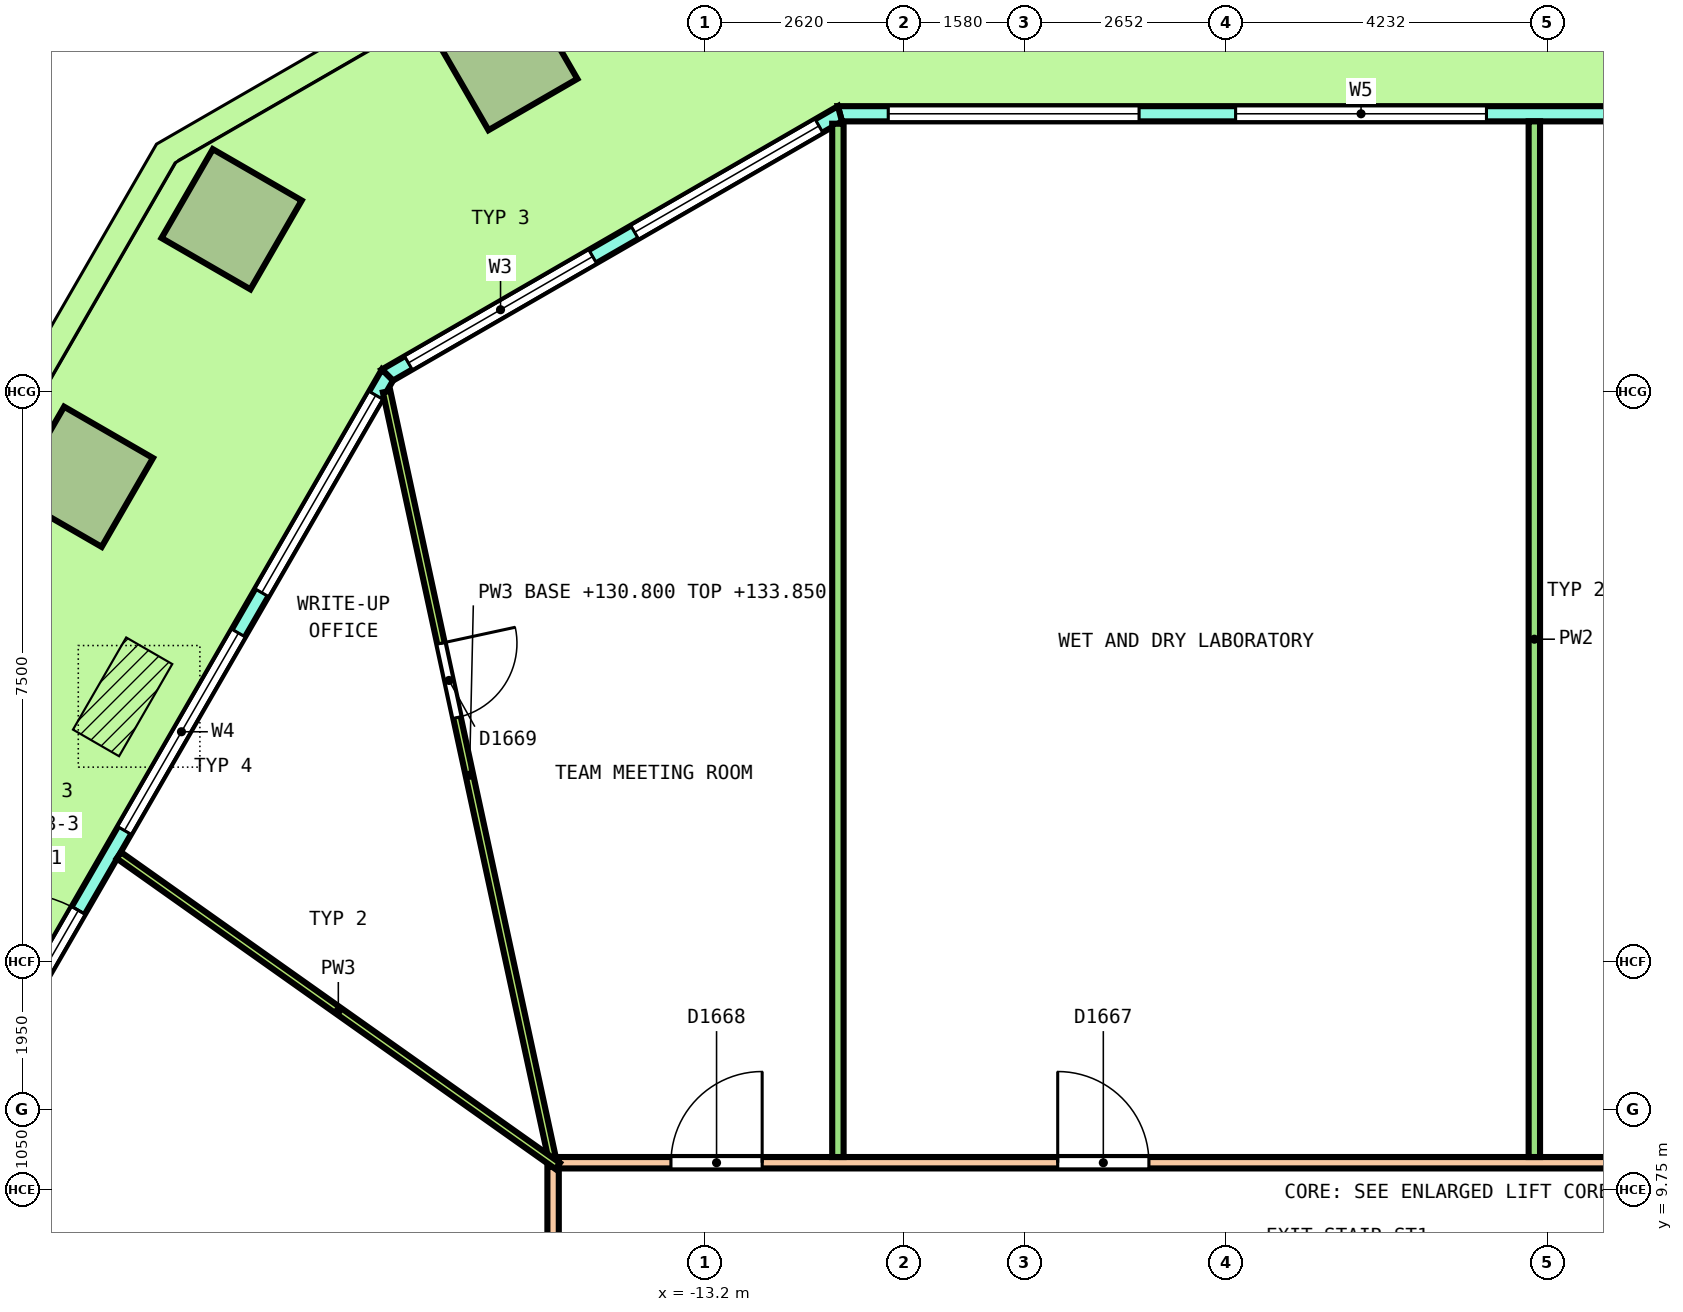
"""IFC4 building model, lengths in metres.
Left out: names, types, materials, properties, quantities, classifications, styles, units other than length and angle.
Written with IfcOpenShell. Run it as: python <this file> out.ifc"""

import sys

from ifc_helpers import new_model, si_unit, direction, frame, frame_2d, origin, origin_2d, place, context, subcontext, project, spatial, polyline, rectangle, outline, extrude, element, fill, save


model = new_model("IFC4")
c1 = context("Model", 3, precision=1e-05, world=origin(), true_north=direction((0.0, 1.0)))
c2 = subcontext(c1, "Body", "Model", "MODEL_VIEW")
j1 = project(units=[si_unit("LENGTHUNIT", "METRE"), si_unit("PLANEANGLEUNIT", "RADIAN")], contexts=[c1])
p1 = place(None, origin())
s1 = spatial("IfcSite", under=j1, at=p1, CompositionType="ELEMENT")
p2 = place(p1, origin())
s2 = spatial("IfcBuilding", under=s1, at=p2, CompositionType="ELEMENT")
p3 = place(p2, frame((0.0, 0.0, 130.8)))
s3 = spatial("IfcBuildingStorey", under=s2, at=p3, CompositionType="ELEMENT", Elevation=130.8)
for number, where, z_axis, x_axis in (
    (1, (-15.803, 24.606, 0.0), (0.0, 0.0, 1.0), (-0.866, -0.5, 0.0)),
    (2, (-19.43, 22.512, 0.0), (0.0, 0.0, 1.0), (-0.5, -0.866, 0.0)),
    (3, (-21.386, 19.124, 0.0), (0.0, 0.0, 1.0), (-0.5, -0.866, 0.0)),
):
    element("IfcColumn", number, at=place(p3, frame(where, z_axis=z_axis, x_axis=x_axis)), inside=s3, PredefinedType="COLUMN", context=c2, shape_type="SweptSolid", body=[
        extrude(rectangle(XDim=1.35, YDim=1.35, at=origin_2d()), origin(), (0.0, 0.0, 1.0), 4.04),
    ])
p4 = place(p3, frame((11.426, 23.9, 0.0), z_axis=(0.0, 0.0, 1.0), x_axis=(-1.0, 0.0, 0.0)))
e4 = element("IfcWall", 4, at=p4, inside=s3, PredefinedType="SOLIDWALL", context=c2, shape_type="SweptSolid", body=[
    extrude(outline(polyline([(-0.027, -0.1), (1.014, -0.1), (2.055, -0.1), (3.097, -0.1), (4.138, -0.1), (5.179, -0.1), (6.22, -0.1), (7.261, -0.1), (8.303, -0.1), (9.344, -0.1), (10.385, -0.1), (11.426, -0.1), (12.468, -0.1), (13.509, -0.1), (14.55, -0.1), (15.591, -0.1), (16.632, -0.1), (17.673, -0.1), (18.715, -0.1), (19.756, -0.1), (20.797, -0.1), (21.838, -0.1), (22.879, -0.1), (22.826, 0.1), (21.789, 0.1), (20.753, 0.1), (19.717, 0.1), (18.68, 0.1), (17.644, 0.1), (16.608, 0.1), (15.572, 0.1), (14.535, 0.1), (13.499, 0.1), (12.463, 0.1), (11.426, 0.1), (10.39, 0.1), (9.354, 0.1), (8.317, 0.1), (7.281, 0.1), (6.245, 0.1), (5.208, 0.1), (4.172, 0.1), (3.136, 0.1), (2.099, 0.1), (1.063, 0.1), (0.027, 0.1), (-0.027, -0.1)])), origin(), (0.0, 0.0, 1.0), 4.1),
])
p5 = place(p4, frame((0.635, 0.0, 0.1)))
e5 = element("IfcOpeningElement", 5, at=p5, cuts=e4, PredefinedType="OPENING", context=c2, shape_type="SweptSolid", body=[
    extrude(rectangle(XDim=3.3, YDim=2.9, at=frame_2d((1.65, 1.45))), frame((0.0, 0.11, 0.0), z_axis=(0.0, -1.0, 0.0), x_axis=(1.0, 0.0, 0.0)), (0.0, 0.0, 1.0), 0.22),
])
p6 = place(p4, frame((5.206, 0.0, 0.1)))
e6 = element("IfcOpeningElement", 6, at=p6, cuts=e4, PredefinedType="OPENING", context=c2, shape_type="SweptSolid", body=[
    extrude(rectangle(XDim=3.3, YDim=2.9, at=frame_2d((1.65, 1.45))), frame((0.0, 0.11, 0.0), z_axis=(0.0, -1.0, 0.0), x_axis=(1.0, 0.0, 0.0)), (0.0, 0.0, 1.0), 0.22),
])
p7 = place(p4, frame((10.526, 0.0, 0.0)))
e7 = element("IfcOpeningElement", 7, at=p7, cuts=e4, PredefinedType="OPENING", context=c2, shape_type="SweptSolid", body=[
    extrude(rectangle(XDim=1.8, YDim=2.4, at=frame_2d((0.9, 1.2))), frame((0.0, 0.11, 0.0), z_axis=(0.0, -1.0, 0.0), x_axis=(1.0, 0.0, 0.0)), (0.0, 0.0, 1.0), 0.22),
])
p8 = place(p4, frame((10.526, 0.0, 2.55)))
e8 = element("IfcOpeningElement", 8, at=p8, cuts=e4, PredefinedType="OPENING", context=c2, shape_type="SweptSolid", body=[
    extrude(rectangle(XDim=1.8, YDim=0.45, at=frame_2d((0.9, 0.225))), frame((0.0, 0.11, 0.0), z_axis=(0.0, -1.0, 0.0), x_axis=(1.0, 0.0, 0.0)), (0.0, 0.0, 1.0), 0.22),
])
p9 = place(p4, frame((14.347, 0.0, 0.1)))
e9 = element("IfcOpeningElement", 9, at=p9, cuts=e4, PredefinedType="OPENING", context=c2, shape_type="SweptSolid", body=[
    extrude(rectangle(XDim=3.3, YDim=2.9, at=frame_2d((1.65, 1.45))), frame((0.0, 0.11, 0.0), z_axis=(0.0, -1.0, 0.0), x_axis=(1.0, 0.0, 0.0)), (0.0, 0.0, 1.0), 0.22),
])
p10 = place(p4, frame((18.917, 0.0, 0.1)))
e10 = element("IfcOpeningElement", 10, at=p10, cuts=e4, PredefinedType="OPENING", context=c2, shape_type="SweptSolid", body=[
    extrude(rectangle(XDim=3.3, YDim=2.9, at=frame_2d((1.65, 1.45))), frame((0.0, 0.11, 0.0), z_axis=(0.0, -1.0, 0.0), x_axis=(1.0, 0.0, 0.0)), (0.0, 0.0, 1.0), 0.22),
])
p11 = place(p3, frame((-11.426, 23.9, 0.0), z_axis=(0.0, 0.0, 1.0), x_axis=(-0.866029458321, -0.49999297727, 0.0)))
e11 = element("IfcWall", 11, at=p11, inside=s3, PredefinedType="SOLIDWALL", context=c2, shape_type="SweptSolid", body=[
    extrude(outline(polyline([(-0.027, -0.1), (1.128, -0.1), (2.282, -0.1), (3.437, -0.1), (4.592, -0.1), (5.747, -0.1), (6.901, -0.1), (6.848, 0.1), (5.711, 0.1), (4.574, 0.1), (3.437, 0.1), (2.301, 0.1), (1.164, 0.1), (0.027, 0.1), (-0.027, -0.1)])), origin(), (0.0, 0.0, 1.0), 4.1),
])
p12 = place(p11, frame((0.319, 0.0, 0.1)))
e12 = element("IfcOpeningElement", 12, at=p12, cuts=e11, PredefinedType="OPENING", context=c2, shape_type="SweptSolid", body=[
    extrude(rectangle(XDim=2.8, YDim=2.9, at=frame_2d((1.4, 1.45))), frame((0.0, 0.11, 0.0), z_axis=(0.0, -1.0, 0.0), x_axis=(1.0, 0.0, 0.0)), (0.0, 0.0, 1.0), 0.22),
])
p13 = place(p11, frame((3.756, 0.0, 0.1)))
e13 = element("IfcOpeningElement", 13, at=p13, cuts=e11, PredefinedType="OPENING", context=c2, shape_type="SweptSolid", body=[
    extrude(rectangle(XDim=2.8, YDim=2.9, at=frame_2d((1.4, 1.45))), frame((0.0, 0.11, 0.0), z_axis=(0.0, -1.0, 0.0), x_axis=(1.0, 0.0, 0.0)), (0.0, 0.0, 1.0), 0.22),
])
p14 = place(p3, frame((-17.38, 20.463, 0.0), z_axis=(0.0, 0.0, 1.0), x_axis=(-0.500000137386, -0.866025324465, 0.0)))
e14 = element("IfcWall", 14, at=p14, inside=s3, PredefinedType="SOLIDWALL", context=c2, shape_type="SweptSolid", body=[
    extrude(outline(polyline([(-0.027, -0.1), (0.979, -0.1), (1.986, -0.1), (2.992, -0.1), (3.999, -0.1), (5.005, -0.1), (6.012, -0.1), (7.018, -0.1), (8.025, -0.1), (9.031, -0.1), (10.038, -0.1), (11.044, -0.1), (12.051, -0.1), (13.057, -0.1), (14.063, -0.1), (15.07, -0.1), (16.076, -0.1), (17.083, -0.1), (18.089, -0.1), (18.036, 0.1), (17.035, 0.1), (16.035, 0.1), (15.034, 0.1), (14.034, 0.1), (13.033, 0.1), (12.033, 0.1), (11.032, 0.1), (10.032, 0.1), (9.031, 0.1), (8.031, 0.1), (7.03, 0.1), (6.03, 0.1), (5.029, 0.1), (4.029, 0.1), (3.028, 0.1), (2.028, 0.1), (1.027, 0.1), (0.027, 0.1), (-0.027, -0.1)])), origin(), (0.0, 0.0, 1.0), 4.1),
])
p15 = place(p14, frame((0.306, 0.0, 0.1)))
e15 = element("IfcOpeningElement", 15, at=p15, cuts=e14, PredefinedType="OPENING", context=c2, shape_type="SweptSolid", body=[
    extrude(rectangle(XDim=3.0, YDim=2.9, at=frame_2d((1.5, 1.45))), frame((0.0, 0.11, 0.0), z_axis=(0.0, -1.0, 0.0), x_axis=(1.0, 0.0, 0.0)), (0.0, 0.0, 1.0), 0.22),
])
p16 = place(p14, frame((3.919, 0.0, 0.1)))
e16 = element("IfcOpeningElement", 16, at=p16, cuts=e14, PredefinedType="OPENING", context=c2, shape_type="SweptSolid", body=[
    extrude(rectangle(XDim=3.0, YDim=2.9, at=frame_2d((1.5, 1.45))), frame((0.0, 0.11, 0.0), z_axis=(0.0, -1.0, 0.0), x_axis=(1.0, 0.0, 0.0)), (0.0, 0.0, 1.0), 0.22),
])
p17 = place(p14, frame((8.131, 0.0, 0.0)))
e17 = element("IfcOpeningElement", 17, at=p17, cuts=e14, PredefinedType="OPENING", context=c2, shape_type="SweptSolid", body=[
    extrude(rectangle(XDim=1.8, YDim=2.4, at=frame_2d((0.9, 1.2))), frame((0.0, 0.11, 0.0), z_axis=(0.0, -1.0, 0.0), x_axis=(1.0, 0.0, 0.0)), (0.0, 0.0, 1.0), 0.22),
])
p18 = place(p14, frame((8.131, 0.0, 2.55)))
e18 = element("IfcOpeningElement", 18, at=p18, cuts=e14, PredefinedType="OPENING", context=c2, shape_type="SweptSolid", body=[
    extrude(rectangle(XDim=1.8, YDim=0.45, at=frame_2d((0.9, 0.225))), frame((0.0, 0.11, 0.0), z_axis=(0.0, -1.0, 0.0), x_axis=(1.0, 0.0, 0.0)), (0.0, 0.0, 1.0), 0.22),
])
p19 = place(p14, frame((11.144, 0.0, 0.1)))
e19 = element("IfcOpeningElement", 19, at=p19, cuts=e14, PredefinedType="OPENING", context=c2, shape_type="SweptSolid", body=[
    extrude(rectangle(XDim=3.0, YDim=2.9, at=frame_2d((1.5, 1.45))), frame((0.0, 0.11, 0.0), z_axis=(0.0, -1.0, 0.0), x_axis=(1.0, 0.0, 0.0)), (0.0, 0.0, 1.0), 0.22),
])
p20 = place(p14, frame((14.756, 0.0, 0.1)))
e20 = element("IfcOpeningElement", 20, at=p20, cuts=e14, PredefinedType="OPENING", context=c2, shape_type="SweptSolid", body=[
    extrude(rectangle(XDim=3.0, YDim=2.9, at=frame_2d((1.5, 1.45))), frame((0.0, 0.11, 0.0), z_axis=(0.0, -1.0, 0.0), x_axis=(1.0, 0.0, 0.0)), (0.0, 0.0, 1.0), 0.22),
])
p21 = place(p3, frame((-15.125, 10.1, 0.0), z_axis=(0.0, 0.0, 1.0), x_axis=(1.0, 0.0, 0.0)))
e21 = element("IfcWall", 21, at=p21, inside=s3, PredefinedType="PARTITIONING", context=c2, shape_type="SweptSolid", body=[
    extrude(rectangle(XDim=30.25, YDim=0.15, at=frame_2d((15.125, 0.0))), origin(), (0.0, 0.0, 1.0), 3.05),
])
p22 = place(p21, frame((16.895, 0.0, 0.0)))
e22 = element("IfcOpeningElement", 22, at=p22, cuts=e21, PredefinedType="OPENING", context=c2, shape_type="SweptSolid", body=[
    extrude(rectangle(XDim=1.2, YDim=2.1, at=frame_2d((0.6, 1.05))), frame((0.0, 0.085, 0.0), z_axis=(0.0, -1.0, 0.0), x_axis=(1.0, 0.0, 0.0)), (0.0, 0.0, 1.0), 0.17),
])
p23 = place(p21, frame((6.564, 0.0, 0.0)))
e23 = element("IfcOpeningElement", 23, at=p23, cuts=e21, PredefinedType="OPENING", context=c2, shape_type="SweptSolid", body=[
    extrude(rectangle(XDim=1.2, YDim=2.1, at=frame_2d((0.6, 1.05))), frame((0.0, 0.085, 0.0), z_axis=(0.0, -1.0, 0.0), x_axis=(1.0, 0.0, 0.0)), (0.0, 0.0, 1.0), 0.17),
])
p24 = place(p21, frame((1.476, 0.0, 0.0)))
e24 = element("IfcOpeningElement", 24, at=p24, cuts=e21, PredefinedType="OPENING", context=c2, shape_type="SweptSolid", body=[
    extrude(rectangle(XDim=1.2, YDim=2.1, at=frame_2d((0.6, 1.05))), frame((0.0, 0.085, 0.0), z_axis=(0.0, -1.0, 0.0), x_axis=(1.0, 0.0, 0.0)), (0.0, 0.0, 1.0), 0.17),
])
p25 = place(p3, frame((-15.2, 0.426, 0.0), z_axis=(0.0, 0.0, 1.0), x_axis=(0.0, 1.0, 0.0)))
e25 = element("IfcWall", 25, at=p25, inside=s3, PredefinedType="PARTITIONING", context=c2, shape_type="SweptSolid", body=[
    extrude(rectangle(XDim=9.624, YDim=0.15, at=frame_2d((4.812, 0.0))), origin(), (0.0, 0.0, 1.0), 3.05),
])
p26 = place(p25, frame((6.951, 0.0, 0.0)))
e26 = element("IfcOpeningElement", 26, at=p26, cuts=e25, PredefinedType="OPENING", context=c2, shape_type="SweptSolid", body=[
    extrude(rectangle(XDim=1.2, YDim=2.1, at=frame_2d((0.6, 1.05))), frame((0.0, 0.085, 0.0), z_axis=(0.0, -1.0, 0.0), x_axis=(1.0, 0.0, 0.0)), (0.0, 0.0, 1.0), 0.17),
])
p27 = place(p3, frame((-2.291, 10.175, 0.0), z_axis=(0.0, 0.0, 1.0), x_axis=(0.0, 1.0, 0.0)))
e27 = element("IfcWall", 27, at=p27, inside=s3, PredefinedType="PARTITIONING", context=c2, shape_type="SweptSolid", body=[
    extrude(rectangle(XDim=13.625, YDim=0.15, at=frame_2d((6.812, 0.0))), origin(), (0.0, 0.0, 1.0), 3.05),
])
p28 = place(p3, frame((-11.453, 10.175, 0.0), z_axis=(0.0, 0.0, 1.0), x_axis=(0.0, 1.0, 0.0)))
e28 = element("IfcWall", 28, at=p28, inside=s3, PredefinedType="PARTITIONING", context=c2, shape_type="SweptSolid", body=[
    extrude(rectangle(XDim=13.594, YDim=0.15, at=frame_2d((6.797, 0.0))), origin(), (0.0, 0.0, 1.0), 3.05),
])
p29 = place(p3, frame((-17.39, 20.245, 0.0), z_axis=(0.0, 0.0, 1.0), x_axis=(0.211012362952, -0.977483392535, 0.0)))
e29 = element("IfcWall", 29, at=p29, inside=s3, PredefinedType="PARTITIONING", context=c2, shape_type="SweptSolid", body=[
    extrude(rectangle(XDim=10.329, YDim=0.1, at=frame_2d((5.164, 0.0))), origin(), (0.0, 0.0, 1.0), 3.05),
])
p30 = place(p29, frame((3.387, 0.0, 0.0)))
e30 = element("IfcOpeningElement", 30, at=p30, cuts=e29, PredefinedType="OPENING", context=c2, shape_type="SweptSolid", body=[
    extrude(rectangle(XDim=1.0, YDim=2.1, at=frame_2d((0.5, 1.05))), frame((0.0, 0.06, 0.0), z_axis=(0.0, -1.0, 0.0), x_axis=(1.0, 0.0, 0.0)), (0.0, 0.0, 1.0), 0.12),
])
p31 = place(p3, frame((-20.912, 14.144, 0.0), z_axis=(0.0, 0.0, 1.0), x_axis=(0.816149265307, -0.577841134516, 0.0)))
e31 = element("IfcWall", 31, at=p31, inside=s3, PredefinedType="PARTITIONING", context=c2, shape_type="SweptSolid", body=[
    extrude(rectangle(XDim=7.074, YDim=0.1, at=frame_2d((3.537, 0.0))), origin(), (0.0, 0.0, 1.0), 3.05),
])
p32 = place(p9, origin())
e32 = element("IfcWindow", 32, at=p32, inside=s3, PartitioningType="SINGLE_PANEL", PredefinedType="WINDOW", context=c2, shape_type="SweptSolid", body=[
    extrude(rectangle(XDim=3.3, YDim=2.9, at=frame_2d((1.65, 1.45))), frame((0.0, 0.03, 0.0), z_axis=(0.0, -1.0, 0.0), x_axis=(1.0, 0.0, 0.0)), (0.0, 0.0, 1.0), 0.06),
])
fill(e9, e32)
p33 = place(p10, origin())
e33 = element("IfcWindow", 33, at=p33, inside=s3, PartitioningType="SINGLE_PANEL", PredefinedType="WINDOW", context=c2, shape_type="SweptSolid", body=[
    extrude(rectangle(XDim=3.3, YDim=2.9, at=frame_2d((1.65, 1.45))), frame((0.0, 0.03, 0.0), z_axis=(0.0, -1.0, 0.0), x_axis=(1.0, 0.0, 0.0)), (0.0, 0.0, 1.0), 0.06),
])
fill(e10, e33)
p34 = place(p12, origin())
e34 = element("IfcWindow", 34, at=p34, inside=s3, PartitioningType="SINGLE_PANEL", PredefinedType="WINDOW", context=c2, shape_type="SweptSolid", body=[
    extrude(rectangle(XDim=2.8, YDim=2.9, at=frame_2d((1.4, 1.45))), frame((0.0, 0.03, 0.0), z_axis=(0.0, -1.0, 0.0), x_axis=(1.0, 0.0, 0.0)), (0.0, 0.0, 1.0), 0.06),
])
fill(e12, e34)
p35 = place(p13, origin())
e35 = element("IfcWindow", 35, at=p35, inside=s3, PartitioningType="SINGLE_PANEL", PredefinedType="WINDOW", context=c2, shape_type="SweptSolid", body=[
    extrude(rectangle(XDim=2.8, YDim=2.9, at=frame_2d((1.4, 1.45))), frame((0.0, 0.03, 0.0), z_axis=(0.0, -1.0, 0.0), x_axis=(1.0, 0.0, 0.0)), (0.0, 0.0, 1.0), 0.06),
])
fill(e13, e35)
p36 = place(p15, origin())
e36 = element("IfcWindow", 36, at=p36, inside=s3, PartitioningType="SINGLE_PANEL", PredefinedType="WINDOW", context=c2, shape_type="SweptSolid", body=[
    extrude(rectangle(XDim=3.0, YDim=2.9, at=frame_2d((1.5, 1.45))), frame((0.0, 0.03, 0.0), z_axis=(0.0, -1.0, 0.0), x_axis=(1.0, 0.0, 0.0)), (0.0, 0.0, 1.0), 0.06),
])
fill(e15, e36)
p37 = place(p16, origin())
e37 = element("IfcWindow", 37, at=p37, inside=s3, PartitioningType="SINGLE_PANEL", PredefinedType="WINDOW", context=c2, shape_type="SweptSolid", body=[
    extrude(rectangle(XDim=3.0, YDim=2.9, at=frame_2d((1.5, 1.45))), frame((0.0, 0.03, 0.0), z_axis=(0.0, -1.0, 0.0), x_axis=(1.0, 0.0, 0.0)), (0.0, 0.0, 1.0), 0.06),
])
fill(e16, e37)
p38 = place(p17, origin())
e38 = element("IfcDoor", 38, at=p38, inside=s3, OperationType="DOUBLE_DOOR_SINGLE_SWING", PredefinedType="DOOR", context=c2, shape_type="SweptSolid", body=[
    extrude(rectangle(XDim=1.8, YDim=2.4, at=frame_2d((0.9, 1.2))), frame((0.0, 0.025, 0.0), z_axis=(0.0, -1.0, 0.0), x_axis=(1.0, 0.0, 0.0)), (0.0, 0.0, 1.0), 0.05),
])
fill(e17, e38)
p39 = place(p18, origin())
e39 = element("IfcWindow", 39, at=p39, inside=s3, PartitioningType="SINGLE_PANEL", PredefinedType="WINDOW", context=c2, shape_type="SweptSolid", body=[
    extrude(rectangle(XDim=1.8, YDim=0.45, at=frame_2d((0.9, 0.225))), frame((0.0, 0.03, 0.0), z_axis=(0.0, -1.0, 0.0), x_axis=(1.0, 0.0, 0.0)), (0.0, 0.0, 1.0), 0.06),
])
fill(e18, e39)
p40 = place(p23, origin())
e40 = element("IfcDoor", 40, at=p40, inside=s3, OperationType="DOUBLE_DOOR_SINGLE_SWING", PredefinedType="DOOR", context=c2, shape_type="SweptSolid", body=[
    extrude(rectangle(XDim=1.2, YDim=2.1, at=frame_2d((0.6, 1.05))), frame((0.0, 0.025, 0.0), z_axis=(0.0, -1.0, 0.0), x_axis=(1.0, 0.0, 0.0)), (0.0, 0.0, 1.0), 0.05),
])
fill(e23, e40)
p41 = place(p24, origin())
e41 = element("IfcDoor", 41, at=p41, inside=s3, OperationType="DOUBLE_DOOR_SINGLE_SWING", PredefinedType="DOOR", context=c2, shape_type="SweptSolid", body=[
    extrude(rectangle(XDim=1.2, YDim=2.1, at=frame_2d((0.6, 1.05))), frame((0.0, 0.025, 0.0), z_axis=(0.0, -1.0, 0.0), x_axis=(1.0, 0.0, 0.0)), (0.0, 0.0, 1.0), 0.05),
])
fill(e24, e41)
p42 = place(p30, origin())
e42 = element("IfcDoor", 42, at=p42, inside=s3, OperationType="SINGLE_SWING_RIGHT", PredefinedType="DOOR", context=c2, shape_type="SweptSolid", body=[
    extrude(rectangle(XDim=1.0, YDim=2.1, at=frame_2d((0.5, 1.05))), frame((0.0, 0.025, 0.0), z_axis=(0.0, -1.0, 0.0), x_axis=(1.0, 0.0, 0.0)), (0.0, 0.0, 1.0), 0.05),
])
fill(e30, e42)
save(model, sys.argv[1])
